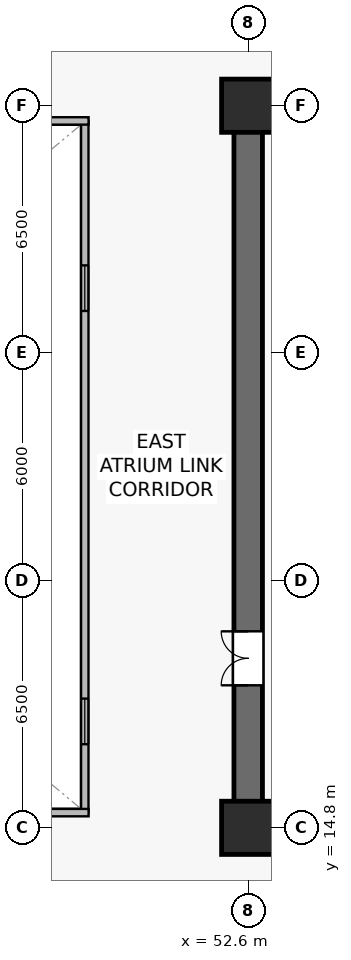
"""IFC4 building model, lengths in metres.
Left out: names, types, materials, properties, quantities, classifications, styles, units other than length and angle.
Written with IfcOpenShell. Run it as: python <this file> out.ifc"""

import sys

from ifc_helpers import new_model, si_unit, direction, frame, frame_2d, origin, origin_2d, place, context, subcontext, project, spatial, rectangle, extrude, source, transform, mapped, element, fill, save


model = new_model("IFC4")
c1 = context("Model", 3, precision=1e-05, world=origin(), true_north=direction((0.0, 1.0)))
c2 = subcontext(c1, "Body", "Model", "MODEL_VIEW")
j1 = project(units=[si_unit("LENGTHUNIT", "METRE"), si_unit("PLANEANGLEUNIT", "RADIAN")], contexts=[c1])
p1 = place(None, origin())
s1 = spatial("IfcSite", under=j1, at=p1, CompositionType="ELEMENT")
p2 = place(p1, origin())
s2 = spatial("IfcBuilding", under=s1, at=p2, CompositionType="ELEMENT")
p3 = place(p2, frame((0.0, 0.0, 78.5)))
s3 = spatial("IfcBuildingStorey", under=s2, at=p3, CompositionType="ELEMENT", Elevation=78.5)
p4 = place(p3, frame((52.225, 14.8, 0.0), z_axis=(0.0, 0.0, 1.0), x_axis=(1.0, 0.0, 0.0)))
e1 = element("IfcWall", 1, at=p4, inside=s3, PredefinedType="SHEAR", context=c2, shape_type="SweptSolid", body=[
    extrude(rectangle(XDim=15.55, YDim=0.75, at=frame_2d((7.775, 0.0))), origin(), (0.0, 0.0, 1.0), 3.78),
])
p5 = place(p3, frame((52.225, 33.8, 0.0), z_axis=(0.0, 0.0, 1.0), x_axis=(1.0, 0.0, 0.0)))
e2 = element("IfcWall", 2, at=p5, inside=s3, PredefinedType="SHEAR", context=c2, shape_type="SweptSolid", body=[
    extrude(rectangle(XDim=15.55, YDim=0.75, at=frame_2d((7.775, 0.0))), origin(), (0.0, 0.0, 1.0), 3.78),
])
p6 = place(p5, frame((8.875, 0.0, 0.0)))
e3 = element("IfcOpeningElement", 3, at=p6, cuts=e2, PredefinedType="OPENING", context=c2, shape_type="SweptSolid", body=[
    extrude(rectangle(XDim=0.95, YDim=2.15, at=frame_2d((0.475, 1.075))), frame((0.0, 0.385, 0.0), z_axis=(0.0, -1.0, 0.0), x_axis=(1.0, 0.0, 0.0)), (0.0, 0.0, 1.0), 0.77),
])
p7 = place(p5, frame((5.51, 0.0, 0.0)))
e4 = element("IfcOpeningElement", 4, at=p7, cuts=e2, PredefinedType="OPENING", context=c2, shape_type="SweptSolid", body=[
    extrude(rectangle(XDim=0.95, YDim=2.15, at=frame_2d((0.475, 1.075))), frame((0.0, 0.385, 0.0), z_axis=(0.0, -1.0, 0.0), x_axis=(1.0, 0.0, 0.0)), (0.0, 0.0, 1.0), 0.77),
])
p8 = place(p5, frame((2.11, 0.0, 0.0)))
e5 = element("IfcOpeningElement", 5, at=p8, cuts=e2, PredefinedType="OPENING", context=c2, shape_type="SweptSolid", body=[
    extrude(rectangle(XDim=0.95, YDim=2.15, at=frame_2d((0.475, 1.075))), frame((0.0, 0.385, 0.0), z_axis=(0.0, -1.0, 0.0), x_axis=(1.0, 0.0, 0.0)), (0.0, 0.0, 1.0), 0.77),
])
p9 = place(p3, frame((52.6, 15.175, 0.0), z_axis=(0.0, 0.0, 1.0), x_axis=(0.0, 1.0, 0.0)))
e6 = element("IfcWall", 6, at=p9, inside=s3, PredefinedType="SHEAR", context=c2, shape_type="SweptSolid", body=[
    extrude(rectangle(XDim=18.25, YDim=0.75, at=frame_2d((9.125, 0.0))), origin(), (0.0, 0.0, 1.0), 3.78),
])
p10 = place(p9, frame((3.375, 0.0, 0.0)))
e7 = element("IfcOpeningElement", 7, at=p10, cuts=e6, PredefinedType="OPENING", context=c2, shape_type="SweptSolid", body=[
    extrude(rectangle(XDim=1.42, YDim=2.2, at=frame_2d((0.71, 1.1))), frame((0.0, 0.385, 0.0), z_axis=(0.0, -1.0, 0.0), x_axis=(1.0, 0.0, 0.0)), (0.0, 0.0, 1.0), 0.77),
])
m1 = source(origin(), c2, "Body", "SweptSolid", [
    extrude(rectangle(XDim=1.4, YDim=1.4, at=origin_2d()), origin(), (0.0, 0.0, 1.0), 4.1),
])
for number, where, z_axis, x_axis in (
    (8, (52.6, 14.8, 0.0), (0.0, 0.0, 1.0), (1.0, 0.0, 0.0)),
    (9, (52.6, 33.8, 0.0), (0.0, 0.0, 1.0), (1.0, 0.0, 0.0)),
):
    element("IfcColumn", number, at=place(p3, frame(where, z_axis=z_axis, x_axis=x_axis)), inside=s3, PredefinedType="COLUMN", context=c2, shape_type="MappedRepresentation", body=[
        mapped(m1, transform((0.0, 0.0, 0.0), scale=1.0)),
    ])
p11 = place(p3, frame((48.3, 15.2, 0.0), z_axis=(0.0, 0.0, 1.0), x_axis=(0.0, 1.0, 0.0)))
e10 = element("IfcWall", 10, at=p11, inside=s3, PredefinedType="SOLIDWALL", context=c2, shape_type="SweptSolid", body=[
    extrude(rectangle(XDim=18.2, YDim=0.195, at=frame_2d((9.1, 0.0))), origin(), (0.0, 0.0, 1.0), 3.78),
])
p12 = place(p11, frame((1.8, 0.0, 0.9)))
e11 = element("IfcOpeningElement", 11, at=p12, cuts=e10, PredefinedType="OPENING", context=c2, shape_type="SweptSolid", body=[
    extrude(rectangle(XDim=1.2, YDim=1.35, at=frame_2d((0.6, 0.675))), frame((0.0, 0.107, 0.0), z_axis=(0.0, -1.0, 0.0), x_axis=(1.0, 0.0, 0.0)), (0.0, 0.0, 1.0), 0.215),
])
p13 = place(p11, frame((13.2, 0.0, 0.9)))
e12 = element("IfcOpeningElement", 12, at=p13, cuts=e10, PredefinedType="OPENING", context=c2, shape_type="SweptSolid", body=[
    extrude(rectangle(XDim=1.2, YDim=1.35, at=frame_2d((0.6, 0.675))), frame((0.0, 0.107, 0.0), z_axis=(0.0, -1.0, 0.0), x_axis=(1.0, 0.0, 0.0)), (0.0, 0.0, 1.0), 0.215),
])
for number, where, z_axis, x_axis in (
    (13, (26.4, 15.2, 0.0), (0.0, 0.0, 1.0), (1.0, 0.0, 0.0)),
    (14, (26.4, 33.4, 0.0), (0.0, 0.0, 1.0), (1.0, 0.0, 0.0)),
):
    element("IfcWall", number, at=place(p3, frame(where, z_axis=z_axis, x_axis=x_axis)), inside=s3, PredefinedType="SOLIDWALL", context=c2, shape_type="SweptSolid", body=[
        extrude(rectangle(XDim=22.0, YDim=0.195, at=frame_2d((11.0, 0.0))), origin(), (0.0, 0.0, 1.0), 3.78),
    ])
m2 = source(origin(), c2, "Body", "SweptSolid", [
    extrude(rectangle(XDim=1.2, YDim=1.35, at=frame_2d((0.6, 0.675))), frame((0.0, 0.03, 0.0), z_axis=(0.0, -1.0, 0.0), x_axis=(1.0, 0.0, 0.0)), (0.0, 0.0, 1.0), 0.06),
])
p14 = place(p12, origin())
e15 = element("IfcWindow", 15, at=p14, inside=s3, PartitioningType="SINGLE_PANEL", PredefinedType="WINDOW", context=c2, shape_type="MappedRepresentation", body=[
    mapped(m2, transform((0.0, 0.0, 0.0), scale=1.0)),
])
fill(e11, e15)
p15 = place(p13, origin())
e16 = element("IfcWindow", 16, at=p15, inside=s3, PartitioningType="SINGLE_PANEL", PredefinedType="WINDOW", context=c2, shape_type="MappedRepresentation", body=[
    mapped(m2, transform((0.0, 0.0, 0.0), scale=1.0)),
])
fill(e12, e16)
m3 = source(origin(), c2, "Body", "SweptSolid", [
    extrude(rectangle(XDim=1.42, YDim=2.2, at=frame_2d((0.71, 1.1))), frame((0.0, 0.025, 0.0), z_axis=(0.0, -1.0, 0.0), x_axis=(1.0, 0.0, 0.0)), (0.0, 0.0, 1.0), 0.05),
])
p16 = place(p10, origin())
e17 = element("IfcDoor", 17, at=p16, inside=s3, OperationType="DOUBLE_DOOR_SINGLE_SWING", PredefinedType="DOOR", context=c2, shape_type="MappedRepresentation", body=[
    mapped(m3, transform((0.0, 0.0, 0.0), scale=1.0)),
])
fill(e7, e17)
save(model, sys.argv[1])
